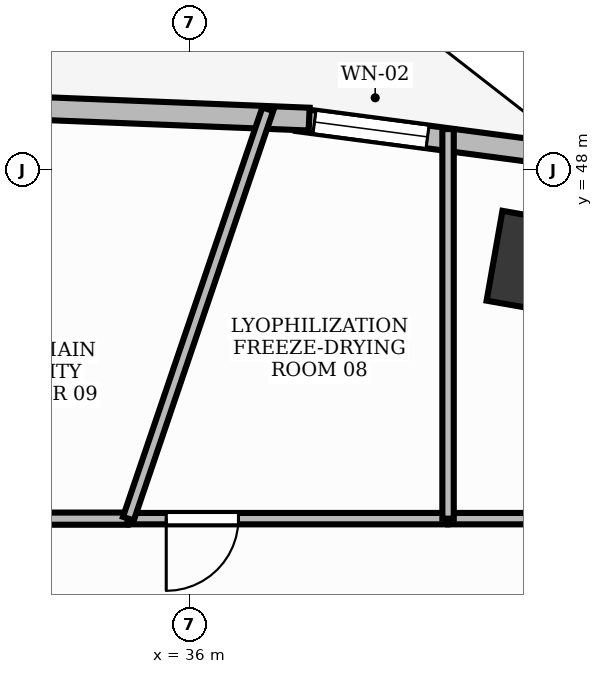
"""IFC4 building model, lengths in metres.
Left out: names, types, materials, properties, quantities, classifications, styles, units other than length and angle.
Written with IfcOpenShell. Run it as: python <this file> out.ifc"""

import sys

from ifc_helpers import new_model, si_unit, direction, frame, frame_2d, origin, origin_2d, place, context, subcontext, project, spatial, rectangle, extrude, element, fill, save


model = new_model("IFC4")
c1 = context("Model", 3, precision=1e-05, world=origin(), true_north=direction((0.0, 1.0)))
c2 = subcontext(c1, "Body", "Model", "MODEL_VIEW")
j1 = project(units=[si_unit("LENGTHUNIT", "METRE"), si_unit("PLANEANGLEUNIT", "RADIAN")], contexts=[c1])
p1 = place(None, origin())
s1 = spatial("IfcSite", under=j1, at=p1, CompositionType="ELEMENT")
p2 = place(p1, origin())
s2 = spatial("IfcBuilding", under=s1, at=p2, CompositionType="ELEMENT")
p3 = place(p2, frame((0.0, 0.0, 94.2)))
s3 = spatial("IfcBuildingStorey", under=s2, at=p3, CompositionType="ELEMENT", Elevation=94.2)
p4 = place(p3, frame((40.604, 46.765, -0.0), z_axis=(0.0, 0.0, 1.0), x_axis=(-0.984868307662, 0.173304404339, 0.0)))
e1 = element("IfcColumn", 1, at=p4, inside=s3, PredefinedType="COLUMN", context=c2, shape_type="SweptSolid", body=[
    extrude(rectangle(XDim=1.2, YDim=1.2, at=origin_2d()), origin(), (0.0, 0.0, 1.0), 3.901),
])
p5 = place(p3, frame((40.964, 48.19, 0.0), z_axis=(0.0, 0.0, 1.0), x_axis=(-0.991369257822, 0.131099178664, 0.0)))
e2 = element("IfcWall", 2, at=p5, inside=s3, PredefinedType="STANDARD", context=c2, shape_type="SweptSolid", body=[
    extrude(rectangle(XDim=3.575, YDim=0.3, at=frame_2d((1.788, 0.0))), origin(), (0.0, 0.0, 1.0), 3.47),
])
p6 = place(p5, frame((1.848, 0.0, 0.95)))
e3 = element("IfcOpeningElement", 3, at=p6, cuts=e2, PredefinedType="OPENING", context=c2, shape_type="SweptSolid", body=[
    extrude(rectangle(XDim=1.5, YDim=1.8, at=frame_2d((0.75, 0.9))), frame((0.0, 0.165, 0.0), z_axis=(0.0, -1.0, 0.0), x_axis=(1.0, 0.0, 0.0)), (0.0, 0.0, 1.0), 0.33),
])
p7 = place(p3, frame((37.574, 48.666, 0.0), z_axis=(0.0, 0.0, 1.0), x_axis=(-0.999212076676, 0.039689114679, 0.0)))
e4 = element("IfcWall", 4, at=p7, inside=s3, PredefinedType="STANDARD", context=c2, shape_type="SweptSolid", body=[
    extrude(rectangle(XDim=3.635, YDim=0.3, at=frame_2d((1.818, 0.0))), origin(), (0.0, 0.0, 1.0), 3.9),
])
p8 = place(p3, frame((44.2, 43.41, 0.0), z_axis=(0.0, 0.0, 1.0), x_axis=(-1.0, 0.0, 0.0)))
e5 = element("IfcWall", 5, at=p8, inside=s3, PredefinedType="PARTITIONING", context=c2, shape_type="SweptSolid", body=[
    extrude(rectangle(XDim=4.798, YDim=0.15, at=frame_2d((2.399, 0.0))), origin(), (0.0, 0.0, 1.0), 2.91),
])
p9 = place(p8, frame((0.24, 0.0, 0.0)))
e6 = element("IfcOpeningElement", 6, at=p9, cuts=e5, PredefinedType="OPENING", context=c2, shape_type="SweptSolid", body=[
    extrude(rectangle(XDim=0.95, YDim=2.15, at=frame_2d((0.475, 1.075))), frame((0.0, 0.09, 0.0), z_axis=(0.0, -1.0, 0.0), x_axis=(1.0, 0.0, 0.0)), (0.0, 0.0, 1.0), 0.18),
])
p10 = place(p3, frame((39.392, 43.41, 0.0), z_axis=(0.0, 0.0, 1.0), x_axis=(-1.0, 0.0, 0.0)))
e7 = element("IfcWall", 7, at=p10, inside=s3, PredefinedType="PARTITIONING", context=c2, shape_type="SweptSolid", body=[
    extrude(rectangle(XDim=4.196, YDim=0.15, at=frame_2d((2.098, 0.0))), origin(), (0.0, 0.0, 1.0), 2.91),
])
p11 = place(p10, frame((2.748, 0.0, 0.0)))
e8 = element("IfcOpeningElement", 8, at=p11, cuts=e7, PredefinedType="OPENING", context=c2, shape_type="SweptSolid", body=[
    extrude(rectangle(XDim=0.95, YDim=2.15, at=frame_2d((0.475, 1.075))), frame((0.0, 0.09, 0.0), z_axis=(0.0, -1.0, 0.0), x_axis=(1.0, 0.0, 0.0)), (0.0, 0.0, 1.0), 0.18),
])
p12 = place(p3, frame((35.186, 43.41, 0.0), z_axis=(0.0, 0.0, 1.0), x_axis=(-1.0, 0.0, 0.0)))
e9 = element("IfcWall", 9, at=p12, inside=s3, PredefinedType="PARTITIONING", context=c2, shape_type="SweptSolid", body=[
    extrude(rectangle(XDim=15.144, YDim=0.16, at=frame_2d((7.572, 0.0))), origin(), (0.0, 0.0, 1.0), 2.91),
])
p13 = place(p12, frame((7.387, 0.0, 0.0)))
e10 = element("IfcOpeningElement", 10, at=p13, cuts=e9, PredefinedType="OPENING", context=c2, shape_type="SweptSolid", body=[
    extrude(rectangle(XDim=0.95, YDim=2.15, at=frame_2d((0.475, 1.075))), frame((0.0, 0.095, 0.0), z_axis=(0.0, -1.0, 0.0), x_axis=(1.0, 0.0, 0.0)), (0.0, 0.0, 1.0), 0.19),
])
p14 = place(p3, frame((39.402, 43.41, 0.0), z_axis=(0.0, 0.0, 1.0), x_axis=(0.0, 1.0, 0.0)))
e11 = element("IfcWall", 11, at=p14, inside=s3, PredefinedType="PARTITIONING", context=c2, shape_type="SweptSolid", body=[
    extrude(rectangle(XDim=5.125, YDim=0.15, at=frame_2d((2.563, 0.0))), origin(), (0.0, 0.0, 1.0), 2.91),
])
p15 = place(p3, frame((35.196, 43.41, 0.0), z_axis=(0.0, 0.0, 1.0), x_axis=(0.322244983046, 0.946656310866, 0.0)))
e12 = element("IfcWall", 12, at=p15, inside=s3, PredefinedType="PARTITIONING", context=c2, shape_type="SweptSolid", body=[
    extrude(rectangle(XDim=5.69, YDim=0.15, at=frame_2d((2.845, 0.0))), origin(), (0.0, 0.0, 1.0), 2.91),
])
p16 = place(p6, origin())
e13 = element("IfcWindow", 13, at=p16, inside=s3, PartitioningType="DOUBLE_PANEL_VERTICAL", PredefinedType="WINDOW", context=c2, shape_type="SweptSolid", body=[
    extrude(rectangle(XDim=1.5, YDim=1.8, at=frame_2d((0.75, 0.9))), frame((0.0, 0.03, 0.0), z_axis=(0.0, -1.0, 0.0), x_axis=(1.0, 0.0, 0.0)), (0.0, 0.0, 1.0), 0.06),
])
fill(e3, e13)
p17 = place(p11, origin())
e14 = element("IfcDoor", 14, at=p17, inside=s3, OperationType="SINGLE_SWING_RIGHT", PredefinedType="DOOR", context=c2, shape_type="SweptSolid", body=[
    extrude(rectangle(XDim=0.95, YDim=2.15, at=frame_2d((0.475, 1.075))), frame((0.0, 0.025, 0.0), z_axis=(0.0, -1.0, 0.0), x_axis=(1.0, 0.0, 0.0)), (0.0, 0.0, 1.0), 0.05),
])
fill(e8, e14)
save(model, sys.argv[1])
